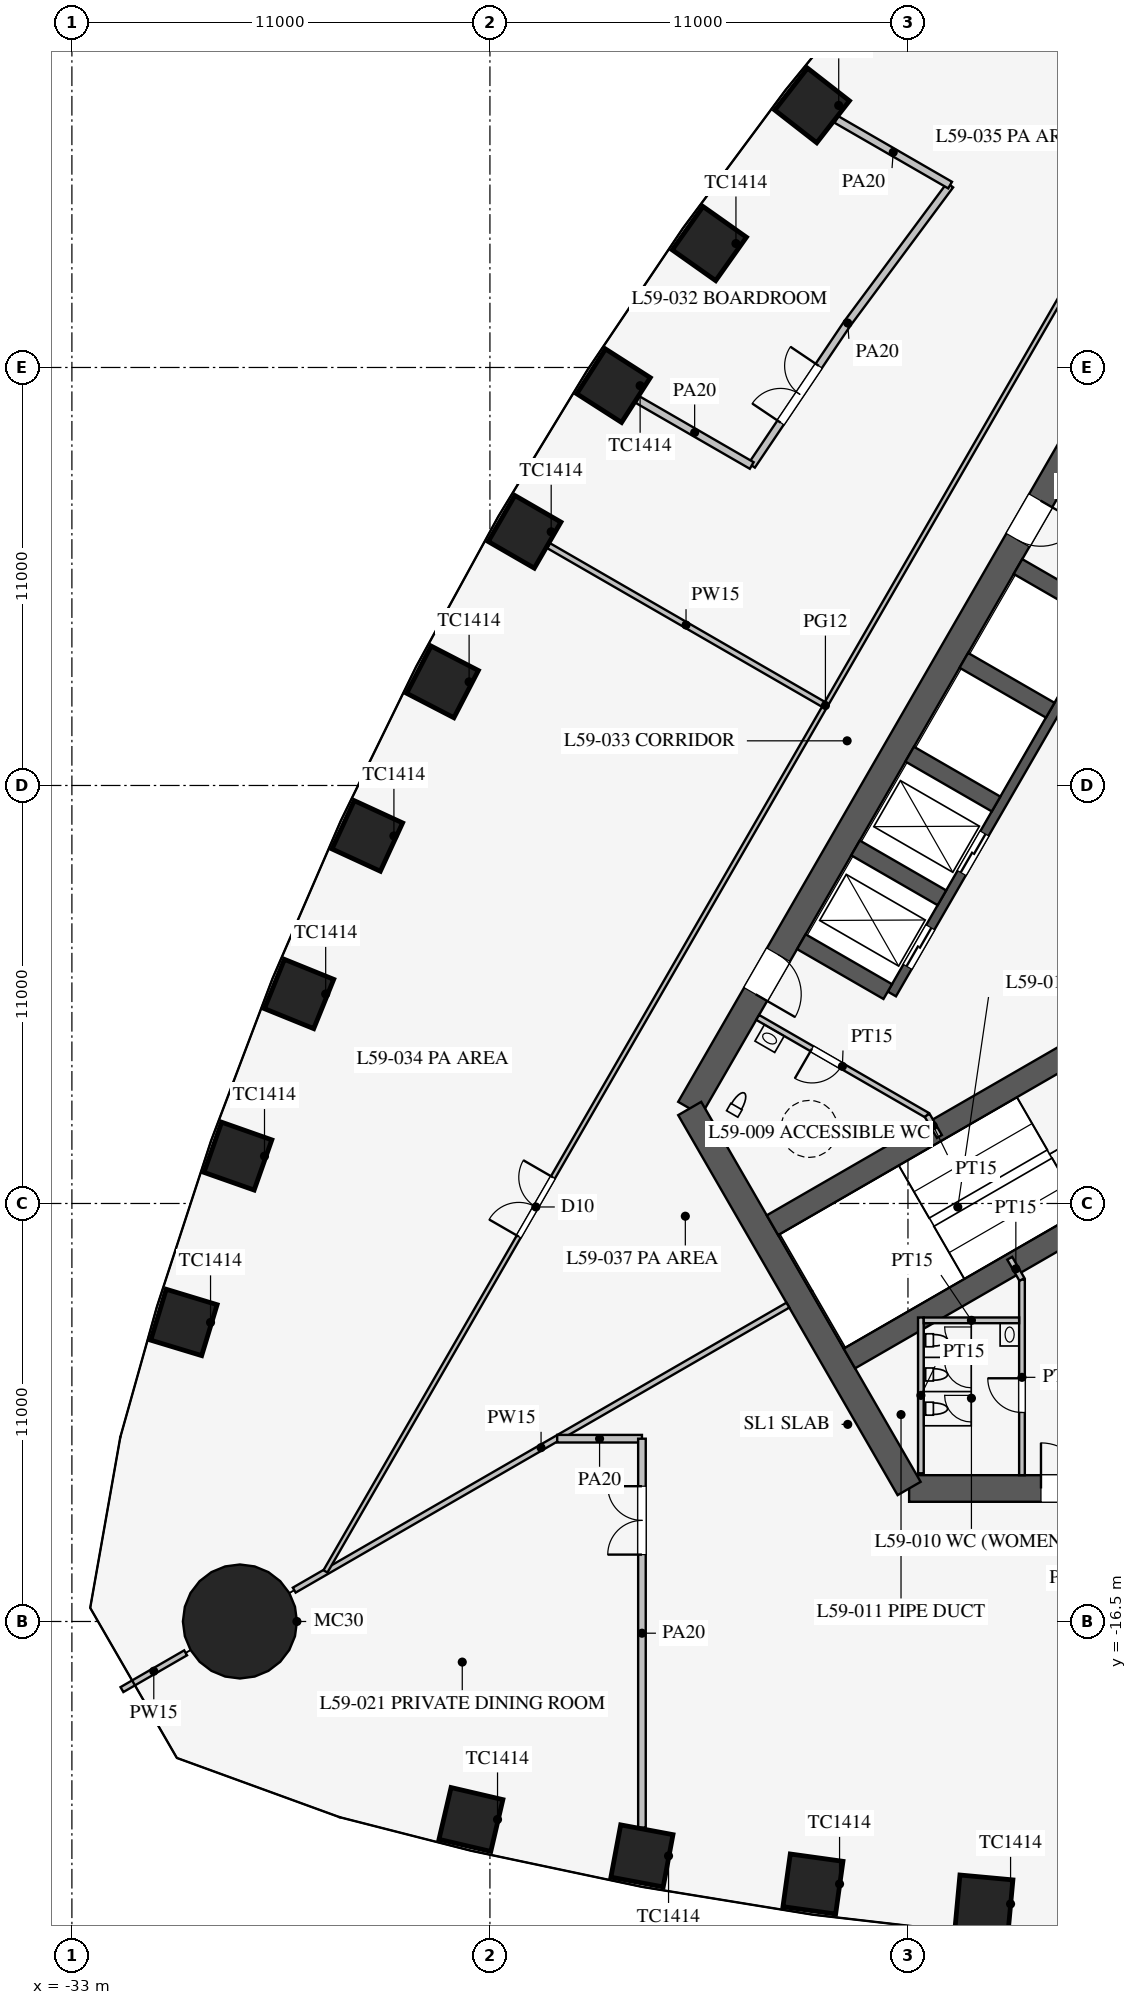
"""IFC4 building model, lengths in metres.
Left out: names, types, materials, properties, quantities, classifications, styles, units other than length and angle.
Written with IfcOpenShell. Run it as: python <this file> out.ifc"""

import sys

from ifc_helpers import new_model, si_unit, direction, frame, frame_2d, origin, origin_2d, place, context, subcontext, project, spatial, rectangle, circle, extrude, element, fill, save


model = new_model("IFC4")
c1 = context("Model", 3, precision=1e-05, world=origin(), true_north=direction((0.0, 1.0)))
c2 = subcontext(c1, "Body", "Model", "MODEL_VIEW")
j1 = project(units=[si_unit("LENGTHUNIT", "METRE"), si_unit("PLANEANGLEUNIT", "RADIAN")], contexts=[c1])
p1 = place(None, origin())
s1 = spatial("IfcSite", under=j1, at=p1, CompositionType="ELEMENT")
p2 = place(p1, origin())
s2 = spatial("IfcBuilding", under=s1, at=p2, CompositionType="ELEMENT")
p3 = place(p2, frame((0.0, 0.0, 256.9)))
s3 = spatial("IfcBuildingStorey", under=s2, at=p3, CompositionType="ELEMENT", Elevation=256.9)
for number, where, z_axis, x_axis in (
    (1, (-22.5, -21.71, 0.0), (0.0, 0.0, 1.0), (0.974, -0.227, 0.0)),
    (2, (-18.0, -22.669, 0.0), (0.0, 0.0, 1.0), (0.983, -0.184, 0.0)),
    (3, (-13.5, -23.408, 0.0), (0.0, 0.0, 1.0), (0.99, -0.138, 0.0)),
    (4, (-9.0, -23.933, 0.0), (0.0, 0.0, 1.0), (0.996, -0.092, 0.0)),
    (5, (-13.522, 23.396, 0.0), (0.0, 0.0, 1.0), (-0.615, -0.789, 0.0)),
    (6, (-16.227, 19.761, 0.0), (0.0, 0.0, 1.0), (-0.577, -0.816, 0.0)),
    (7, (-18.748, 16.02, 0.0), (0.0, 0.0, 1.0), (-0.539, -0.842, 0.0)),
    (8, (-21.088, 12.175, 0.0), (0.0, 0.0, 1.0), (-0.5, -0.866, 0.0)),
    (9, (-23.248, 8.226, 0.0), (0.0, 0.0, 1.0), (-0.46, -0.888, 0.0)),
    (10, (-25.227, 4.172, 0.0), (0.0, 0.0, 1.0), (-0.418, -0.908, 0.0)),
    (11, (-27.022, 0.013, 0.0), (0.0, 0.0, 1.0), (-0.376, -0.927, 0.0)),
    (12, (-28.632, -4.254, 0.0), (0.0, 0.0, 1.0), (-0.332, -0.943, 0.0)),
    (13, (-30.052, -8.63, 0.0), (0.0, 0.0, 1.0), (-0.29, -0.957, 0.0)),
):
    element("IfcColumn", number, at=place(p3, frame(where, z_axis=z_axis, x_axis=x_axis)), inside=s3, PredefinedType="COLUMN", context=c2, shape_type="SweptSolid", body=[
        extrude(rectangle(XDim=1.4, YDim=1.4, at=origin_2d()), origin(), (0.0, 0.0, 1.0), 4.2),
    ])
p4 = place(p3, frame((-28.579, -16.5, 0.0), z_axis=(0.0, 0.0, 1.0), x_axis=(1.0, 0.0, 0.0)))
e14 = element("IfcColumn", 14, at=p4, inside=s3, PredefinedType="COLUMN", context=c2, shape_type="SweptSolid", body=[
    extrude(circle(Radius=1.5, at=origin_2d()), origin(), (0.0, 0.0, 1.0), 4.2),
])
p5 = place(p3, frame((-10.97, -13.0, 0.0), z_axis=(0.0, 0.0, 1.0), x_axis=(1.0, 0.0, 0.0)))
e15 = element("IfcWall", 15, at=p5, inside=s3, PredefinedType="SHEAR", context=c2, shape_type="SweptSolid", body=[
    extrude(rectangle(XDim=21.939, YDim=0.7, at=frame_2d((10.97, 0.0))), origin(), (0.0, 0.0, 1.0), 4.2),
])
p6 = place(p5, frame((17.27, 0.0, 0.0)))
e16 = element("IfcOpeningElement", 16, at=p6, cuts=e15, PredefinedType="OPENING", context=c2, shape_type="SweptSolid", body=[
    extrude(rectangle(XDim=1.2, YDim=2.1, at=frame_2d((0.6, 1.05))), frame((0.0, 0.36, 0.0), z_axis=(0.0, -1.0, 0.0), x_axis=(1.0, 0.0, 0.0)), (0.0, 0.0, 1.0), 0.72),
])
p7 = place(p5, frame((3.47, 0.0, 0.0)))
e17 = element("IfcOpeningElement", 17, at=p7, cuts=e15, PredefinedType="OPENING", context=c2, shape_type="SweptSolid", body=[
    extrude(rectangle(XDim=1.2, YDim=2.1, at=frame_2d((0.6, 1.05))), frame((0.0, 0.36, 0.0), z_axis=(0.0, -1.0, 0.0), x_axis=(1.0, 0.0, 0.0)), (0.0, 0.0, 1.0), 0.72),
])
p8 = place(p3, frame((-5.773, 16.0, 0.0), z_axis=(0.0, 0.0, 1.0), x_axis=(-0.500002442456, -0.866023993627, 0.0)))
e18 = element("IfcWall", 18, at=p8, inside=s3, PredefinedType="SHEAR", context=c2, shape_type="SweptSolid", body=[
    extrude(rectangle(XDim=21.939, YDim=0.7, at=frame_2d((10.97, 0.0))), origin(), (0.0, 0.0, 1.0), 4.2),
])
p9 = place(p8, frame((17.27, 0.0, 0.0)))
e19 = element("IfcOpeningElement", 19, at=p9, cuts=e18, PredefinedType="OPENING", context=c2, shape_type="SweptSolid", body=[
    extrude(rectangle(XDim=1.2, YDim=2.1, at=frame_2d((0.6, 1.05))), frame((0.0, 0.36, 0.0), z_axis=(0.0, -1.0, 0.0), x_axis=(1.0, 0.0, 0.0)), (0.0, 0.0, 1.0), 0.72),
])
p10 = place(p8, frame((3.47, 0.0, 0.0)))
e20 = element("IfcOpeningElement", 20, at=p10, cuts=e18, PredefinedType="OPENING", context=c2, shape_type="SweptSolid", body=[
    extrude(rectangle(XDim=1.2, YDim=2.1, at=frame_2d((0.6, 1.05))), frame((0.0, 0.36, 0.0), z_axis=(0.0, -1.0, 0.0), x_axis=(1.0, 0.0, 0.0)), (0.0, 0.0, 1.0), 0.72),
])
p11 = place(p3, frame((-16.743, -3.0, 0.0), z_axis=(0.0, 0.0, 1.0), x_axis=(0.499995765644, -0.866027848477, 0.0)))
e21 = element("IfcWall", 21, at=p11, inside=s3, PredefinedType="SHEAR", context=c2, shape_type="SweptSolid", body=[
    extrude(rectangle(XDim=11.547, YDim=0.7, at=frame_2d((5.773, 0.0))), origin(), (0.0, 0.0, 1.0), 4.2),
])
p12 = place(p3, frame((-5.724, 9.886, 0.0), z_axis=(0.0, 0.0, 1.0), x_axis=(-0.500001763848, -0.866024385424, 0.0)))
e22 = element("IfcWall", 22, at=p12, inside=s3, PredefinedType="SHEAR", context=c2, shape_type="SweptSolid", body=[
    extrude(rectangle(XDim=11.4, YDim=0.25, at=frame_2d((5.7, 0.0))), origin(), (0.0, 0.0, 1.0), 4.2),
])
p13 = place(p12, frame((6.525, 0.0, 0.0)))
e23 = element("IfcOpeningElement", 23, at=p13, cuts=e22, PredefinedType="OPENING", context=c2, shape_type="SweptSolid", body=[
    extrude(rectangle(XDim=1.2, YDim=2.2, at=frame_2d((0.6, 1.1))), frame((0.0, 0.135, 0.0), z_axis=(0.0, -1.0, 0.0), x_axis=(1.0, 0.0, 0.0)), (0.0, 0.0, 1.0), 0.27),
])
p14 = place(p12, frame((9.375, 0.0, 0.0)))
e24 = element("IfcOpeningElement", 24, at=p14, cuts=e22, PredefinedType="OPENING", context=c2, shape_type="SweptSolid", body=[
    extrude(rectangle(XDim=1.2, YDim=2.2, at=frame_2d((0.6, 1.1))), frame((0.0, 0.135, 0.0), z_axis=(0.0, -1.0, 0.0), x_axis=(1.0, 0.0, 0.0)), (0.0, 0.0, 1.0), 0.27),
])
for number, where, z_axis, x_axis in (
    (25, (-5.832, 9.949, 0.0), (0.0, 0.0, 1.0), (-0.866, 0.5, 0.0)),
    (26, (-7.257, 7.481, 0.0), (0.0, 0.0, 1.0), (-0.866, 0.5, 0.0)),
    (27, (-8.682, 5.012, 0.0), (0.0, 0.0, 1.0), (-0.866, 0.5, 0.0)),
    (28, (-10.107, 2.544, 0.0), (0.0, 0.0, 1.0), (-0.866, 0.5, 0.0)),
    (29, (-11.532, 0.076, 0.0), (0.0, 0.0, 1.0), (-0.866, 0.5, 0.0)),
):
    element("IfcWall", number, at=place(p3, frame(where, z_axis=z_axis, x_axis=x_axis)), inside=s3, PredefinedType="SHEAR", context=c2, shape_type="SweptSolid", body=[
        extrude(rectangle(XDim=2.625, YDim=0.45, at=frame_2d((1.312, 0.0))), origin(), (0.0, 0.0, 1.0), 4.2),
    ])
for number, where, z_axis, x_axis in (
    (30, (-6.663, -1.509, 0.0), (0.0, 0.0, 1.0), (-0.866, -0.5, 0.0)),
    (31, (-4.638, -5.016, 0.0), (0.0, 0.0, 1.0), (-0.866, -0.5, 0.0)),
):
    element("IfcWall", number, at=place(p3, frame(where, z_axis=z_axis, x_axis=x_axis)), inside=s3, PredefinedType="SHEAR", context=c2, shape_type="SweptSolid", body=[
        extrude(rectangle(XDim=9.125, YDim=0.6, at=frame_2d((4.562, 0.0))), origin(), (0.0, 0.0, 1.0), 4.2),
    ])
p15 = place(p3, frame((-8.0, -7.5, 0.0), z_axis=(0.0, 0.0, 1.0), x_axis=(0.0, -1.0, 0.0)))
e32 = element("IfcWall", 32, at=p15, inside=s3, PredefinedType="PARTITIONING", context=c2, shape_type="SweptSolid", body=[
    extrude(rectangle(XDim=5.15, YDim=0.15, at=frame_2d((2.575, 0.0))), origin(), (0.0, 0.0, 1.0), 4.0),
])
p16 = place(p15, frame((2.6, 0.0, 0.0)))
e33 = element("IfcOpeningElement", 33, at=p16, cuts=e32, PredefinedType="OPENING", context=c2, shape_type="SweptSolid", body=[
    extrude(rectangle(XDim=0.9, YDim=2.1, at=frame_2d((0.45, 1.05))), frame((0.0, 0.085, 0.0), z_axis=(0.0, -1.0, 0.0), x_axis=(1.0, 0.0, 0.0)), (0.0, 0.0, 1.0), 0.17),
])
p17 = place(p3, frame((-10.495, -3.178, 0.0), z_axis=(0.0, 0.0, 1.0), x_axis=(-0.866037967349, 0.499978238636, 0.0)))
e34 = element("IfcWall", 34, at=p17, inside=s3, PredefinedType="PARTITIONING", context=c2, shape_type="SweptSolid", body=[
    extrude(rectangle(XDim=5.15, YDim=0.15, at=frame_2d((2.575, 0.0))), origin(), (0.0, 0.0, 1.0), 4.0),
])
p18 = place(p17, frame((2.6, 0.0, 0.0)))
e35 = element("IfcOpeningElement", 35, at=p18, cuts=e34, PredefinedType="OPENING", context=c2, shape_type="SweptSolid", body=[
    extrude(rectangle(XDim=0.9, YDim=2.1, at=frame_2d((0.45, 1.05))), frame((0.0, 0.085, 0.0), z_axis=(0.0, -1.0, 0.0), x_axis=(1.0, 0.0, 0.0)), (0.0, 0.0, 1.0), 0.17),
])
for number, where, z_axis, x_axis in (
    (36, (-10.495, -3.178, 0.0), (0.0, 0.0, 1.0), (0.5, -0.866, 0.0)),
    (37, (-8.0, -7.5, 0.0), (0.0, 0.0, 1.0), (-0.5, 0.866, 0.0)),
):
    element("IfcWall", number, at=place(p3, frame(where, z_axis=z_axis, x_axis=x_axis)), inside=s3, PredefinedType="PARTITIONING", context=c2, shape_type="SweptSolid", body=[
        extrude(rectangle(XDim=0.645, YDim=0.15, at=frame_2d((0.323, 0.0))), origin(), (0.0, 0.0, 1.0), 4.0),
    ])
p19 = place(p3, frame((-10.66, -8.5, 0.0), z_axis=(0.0, 0.0, 1.0), x_axis=(0.0, -1.0, 0.0)))
e38 = element("IfcWall", 38, at=p19, inside=s3, PredefinedType="PARTITIONING", context=c2, shape_type="SweptSolid", body=[
    extrude(rectangle(XDim=4.1, YDim=0.15, at=frame_2d((2.05, 0.0))), origin(), (0.0, 0.0, 1.0), 4.0),
])
p20 = place(p3, frame((-8.075, -8.575, 0.0), z_axis=(0.0, 0.0, 1.0), x_axis=(-1.0, 0.0, 0.0)))
e39 = element("IfcWall", 39, at=p20, inside=s3, PredefinedType="PARTITIONING", context=c2, shape_type="SweptSolid", body=[
    extrude(rectangle(XDim=2.51, YDim=0.15, at=frame_2d((1.255, 0.0))), origin(), (0.0, 0.0, 1.0), 4.0),
])
p21 = place(p3, frame((-14.159, -8.175, 0.0), z_axis=(0.0, 0.0, 1.0), x_axis=(-0.866027028085, -0.499997186618, 0.0)))
e40 = element("IfcWall", 40, at=p21, inside=s3, PredefinedType="PARTITIONING", context=c2, shape_type="SweptSolid", body=[
    extrude(rectangle(XDim=15.0, YDim=0.15, at=frame_2d((7.5, 0.0))), origin(), (0.0, 0.0, 1.0), 2.4),
])
p22 = place(p3, frame((-30.008, -17.325, 0.0), z_axis=(0.0, 0.0, 1.0), x_axis=(-0.866013246922, -0.500021055713, 0.0)))
e41 = element("IfcWall", 41, at=p22, inside=s3, PredefinedType="PARTITIONING", context=c2, shape_type="SweptSolid", body=[
    extrude(rectangle(XDim=1.935, YDim=0.15, at=frame_2d((0.967, 0.0))), origin(), (0.0, 0.0, 1.0), 2.4),
])
p23 = place(p3, frame((-18.0, -11.69, 0.0), z_axis=(0.0, 0.0, 1.0), x_axis=(-1.0, 0.0, 0.0)))
e42 = element("IfcWall", 42, at=p23, inside=s3, PredefinedType="PARTITIONING", context=c2, shape_type="SweptSolid", body=[
    extrude(rectangle(XDim=2.23, YDim=0.2, at=frame_2d((1.115, 0.0))), origin(), (0.0, 0.0, 1.0), 2.9),
])
p24 = place(p3, frame((-18.0, -11.69, 0.0), z_axis=(0.0, 0.0, 1.0), x_axis=(0.0, -1.0, 0.0)))
e43 = element("IfcWall", 43, at=p24, inside=s3, PredefinedType="PARTITIONING", context=c2, shape_type="SweptSolid", body=[
    extrude(rectangle(XDim=10.237, YDim=0.2, at=frame_2d((5.118, 0.0))), origin(), (0.0, 0.0, 1.0), 2.6),
])
p25 = place(p24, frame((1.25, 0.0, 0.15)))
e44 = element("IfcOpeningElement", 44, at=p25, cuts=e43, PredefinedType="OPENING", context=c2, shape_type="SweptSolid", body=[
    extrude(rectangle(XDim=1.8, YDim=2.1, at=frame_2d((0.9, 1.05))), frame((0.0, 0.11, 0.0), z_axis=(0.0, -1.0, 0.0), x_axis=(1.0, 0.0, 0.0)), (0.0, 0.0, 1.0), 0.22),
])
p26 = place(p3, frame((-13.224, 7.635, 0.0), z_axis=(0.0, 0.0, 1.0), x_axis=(-0.866028817718, 0.499994086848, 0.0)))
e45 = element("IfcWall", 45, at=p26, inside=s3, PredefinedType="PARTITIONING", context=c2, shape_type="SweptSolid", body=[
    extrude(rectangle(XDim=8.351, YDim=0.15, at=frame_2d((4.175, 0.0))), origin(), (0.0, 0.0, 1.0), 2.6),
])
p27 = place(p3, frame((-0.016, 30.392, 0.0), z_axis=(0.0, 0.0, 1.0), x_axis=(-0.500000626146, -0.866025042278, 0.0)))
e46 = element("IfcWall", 46, at=p27, inside=s3, PredefinedType="PARTITIONING", context=c2, shape_type="SweptSolid", body=[
    extrude(rectangle(XDim=52.624, YDim=0.12, at=frame_2d((26.312, 0.0))), origin(), (0.0, 0.0, 1.0), 2.9),
])
p28 = place(p27, frame((10.15, 0.0, 0.15)))
e47 = element("IfcOpeningElement", 47, at=p28, cuts=e46, PredefinedType="OPENING", context=c2, shape_type="SweptSolid", body=[
    extrude(rectangle(XDim=1.8, YDim=2.1, at=frame_2d((0.9, 1.05))), frame((0.0, 0.07, 0.0), z_axis=(0.0, -1.0, 0.0), x_axis=(1.0, 0.0, 0.0)), (0.0, 0.0, 1.0), 0.14),
])
p29 = place(p27, frame((40.65, 0.0, 0.15)))
e48 = element("IfcOpeningElement", 48, at=p29, cuts=e46, PredefinedType="OPENING", context=c2, shape_type="SweptSolid", body=[
    extrude(rectangle(XDim=1.8, YDim=2.1, at=frame_2d((0.9, 1.05))), frame((0.0, 0.07, 0.0), z_axis=(0.0, -1.0, 0.0), x_axis=(1.0, 0.0, 0.0)), (0.0, 0.0, 1.0), 0.14),
])
p30 = place(p3, frame((-9.892, 21.299, 0.0), z_axis=(0.0, 0.0, 1.0), x_axis=(-0.596173167565, -0.802855873912, 0.0)))
e49 = element("IfcWall", 49, at=p30, inside=s3, PredefinedType="PARTITIONING", context=c2, shape_type="SweptSolid", body=[
    extrude(rectangle(XDim=4.53, YDim=0.2, at=frame_2d((2.265, 0.0))), origin(), (0.0, 0.0, 1.0), 2.9),
])
p31 = place(p3, frame((-12.592, 17.662, 0.0), z_axis=(0.0, 0.0, 1.0), x_axis=(-0.558466624917, -0.829526991034, 0.0)))
e50 = element("IfcWall", 50, at=p31, inside=s3, PredefinedType="PARTITIONING", context=c2, shape_type="SweptSolid", body=[
    extrude(rectangle(XDim=4.511, YDim=0.2, at=frame_2d((2.255, 0.0))), origin(), (0.0, 0.0, 1.0), 2.9),
])
p32 = place(p31, frame((1.35, 0.0, 0.15)))
e51 = element("IfcOpeningElement", 51, at=p32, cuts=e50, PredefinedType="OPENING", context=c2, shape_type="SweptSolid", body=[
    extrude(rectangle(XDim=1.8, YDim=2.1, at=frame_2d((0.9, 1.05))), frame((0.0, 0.11, 0.0), z_axis=(0.0, -1.0, 0.0), x_axis=(1.0, 0.0, 0.0)), (0.0, 0.0, 1.0), 0.22),
])
p33 = place(p3, frame((-9.892, 21.299, 0.0), z_axis=(0.0, 0.0, 1.0), x_axis=(-0.866012622712, 0.500022136814, 0.0)))
e52 = element("IfcWall", 52, at=p33, inside=s3, PredefinedType="PARTITIONING", context=c2, shape_type="SweptSolid", body=[
    extrude(rectangle(XDim=3.455, YDim=0.2, at=frame_2d((1.728, 0.0))), origin(), (0.0, 0.0, 1.0), 2.4),
])
p34 = place(p3, frame((-15.111, 13.921, 0.0), z_axis=(0.0, 0.0, 1.0), x_axis=(-0.866016800201, 0.500014901547, 0.0)))
e53 = element("IfcWall", 53, at=p34, inside=s3, PredefinedType="PARTITIONING", context=c2, shape_type="SweptSolid", body=[
    extrude(rectangle(XDim=3.469, YDim=0.2, at=frame_2d((1.734, 0.0))), origin(), (0.0, 0.0, 1.0), 2.6),
])
p35 = place(p16, frame((0.9, 0.0, 0.0), z_axis=(0.0, 0.0, 1.0), x_axis=(-1.0, 0.0, 0.0)))
e54 = element("IfcDoor", 54, at=p35, inside=s3, OperationType="SINGLE_SWING_RIGHT", PredefinedType="DOOR", context=c2, shape_type="SweptSolid", body=[
    extrude(rectangle(XDim=0.9, YDim=2.1, at=frame_2d((0.45, 1.05))), frame((0.0, 0.025, 0.0), z_axis=(0.0, -1.0, 0.0), x_axis=(1.0, 0.0, 0.0)), (0.0, 0.0, 1.0), 0.05),
])
fill(e33, e54)
p36 = place(p18, origin())
e55 = element("IfcDoor", 55, at=p36, inside=s3, OperationType="SINGLE_SWING_RIGHT", PredefinedType="DOOR", context=c2, shape_type="SweptSolid", body=[
    extrude(rectangle(XDim=0.9, YDim=2.1, at=frame_2d((0.45, 1.05))), frame((0.0, 0.025, 0.0), z_axis=(0.0, -1.0, 0.0), x_axis=(1.0, 0.0, 0.0)), (0.0, 0.0, 1.0), 0.05),
])
fill(e35, e55)
p37 = place(p7, origin())
e56 = element("IfcDoor", 56, at=p37, inside=s3, OperationType="SINGLE_SWING_LEFT", PredefinedType="DOOR", context=c2, shape_type="SweptSolid", body=[
    extrude(rectangle(XDim=1.2, YDim=2.1, at=frame_2d((0.6, 1.05))), frame((0.0, 0.025, 0.0), z_axis=(0.0, -1.0, 0.0), x_axis=(1.0, 0.0, 0.0)), (0.0, 0.0, 1.0), 0.05),
])
fill(e17, e56)
p38 = place(p9, origin())
e57 = element("IfcDoor", 57, at=p38, inside=s3, OperationType="SINGLE_SWING_RIGHT", PredefinedType="DOOR", context=c2, shape_type="SweptSolid", body=[
    extrude(rectangle(XDim=1.2, YDim=2.1, at=frame_2d((0.6, 1.05))), frame((0.0, 0.025, 0.0), z_axis=(0.0, -1.0, 0.0), x_axis=(1.0, 0.0, 0.0)), (0.0, 0.0, 1.0), 0.05),
])
fill(e19, e57)
p39 = place(p10, origin())
e58 = element("IfcDoor", 58, at=p39, inside=s3, OperationType="SINGLE_SWING_LEFT", PredefinedType="DOOR", context=c2, shape_type="SweptSolid", body=[
    extrude(rectangle(XDim=1.2, YDim=2.1, at=frame_2d((0.6, 1.05))), frame((0.0, 0.025, 0.0), z_axis=(0.0, -1.0, 0.0), x_axis=(1.0, 0.0, 0.0)), (0.0, 0.0, 1.0), 0.05),
])
fill(e20, e58)
p40 = place(p25, frame((1.8, 0.0, 0.0), z_axis=(0.0, 0.0, 1.0), x_axis=(-1.0, 0.0, 0.0)))
e59 = element("IfcDoor", 59, at=p40, inside=s3, OperationType="DOUBLE_DOOR_SINGLE_SWING", PredefinedType="DOOR", context=c2, shape_type="SweptSolid", body=[
    extrude(rectangle(XDim=1.8, YDim=2.1, at=frame_2d((0.9, 1.05))), frame((0.0, 0.025, 0.0), z_axis=(0.0, -1.0, 0.0), x_axis=(1.0, 0.0, 0.0)), (0.0, 0.0, 1.0), 0.05),
])
fill(e44, e59)
p41 = place(p32, frame((1.8, 0.0, 0.0), z_axis=(0.0, 0.0, 1.0), x_axis=(-1.0, 0.0, 0.0)))
e60 = element("IfcDoor", 60, at=p41, inside=s3, OperationType="DOUBLE_DOOR_SINGLE_SWING", PredefinedType="DOOR", context=c2, shape_type="SweptSolid", body=[
    extrude(rectangle(XDim=1.8, YDim=2.1, at=frame_2d((0.9, 1.05))), frame((0.0, 0.025, 0.0), z_axis=(0.0, -1.0, 0.0), x_axis=(1.0, 0.0, 0.0)), (0.0, 0.0, 1.0), 0.05),
])
fill(e51, e60)
p42 = place(p29, frame((1.8, 0.0, 0.0), z_axis=(0.0, 0.0, 1.0), x_axis=(-1.0, 0.0, 0.0)))
e61 = element("IfcDoor", 61, at=p42, inside=s3, OperationType="DOUBLE_DOOR_SINGLE_SWING", PredefinedType="DOOR", context=c2, shape_type="SweptSolid", body=[
    extrude(rectangle(XDim=1.8, YDim=2.1, at=frame_2d((0.9, 1.05))), frame((0.0, 0.025, 0.0), z_axis=(0.0, -1.0, 0.0), x_axis=(1.0, 0.0, 0.0)), (0.0, 0.0, 1.0), 0.05),
])
fill(e48, e61)
p43 = place(p13, origin())
e62 = element("IfcDoor", 62, at=p43, inside=s3, OperationType="DOUBLE_DOOR_SLIDING", PredefinedType="DOOR", context=c2, shape_type="SweptSolid", body=[
    extrude(rectangle(XDim=1.2, YDim=2.2, at=frame_2d((0.6, 1.1))), frame((0.0, 0.025, 0.0), z_axis=(0.0, -1.0, 0.0), x_axis=(1.0, 0.0, 0.0)), (0.0, 0.0, 1.0), 0.05),
])
fill(e23, e62)
p44 = place(p14, origin())
e63 = element("IfcDoor", 63, at=p44, inside=s3, OperationType="DOUBLE_DOOR_SLIDING", PredefinedType="DOOR", context=c2, shape_type="SweptSolid", body=[
    extrude(rectangle(XDim=1.2, YDim=2.2, at=frame_2d((0.6, 1.1))), frame((0.0, 0.025, 0.0), z_axis=(0.0, -1.0, 0.0), x_axis=(1.0, 0.0, 0.0)), (0.0, 0.0, 1.0), 0.05),
])
fill(e24, e63)
save(model, sys.argv[1])
